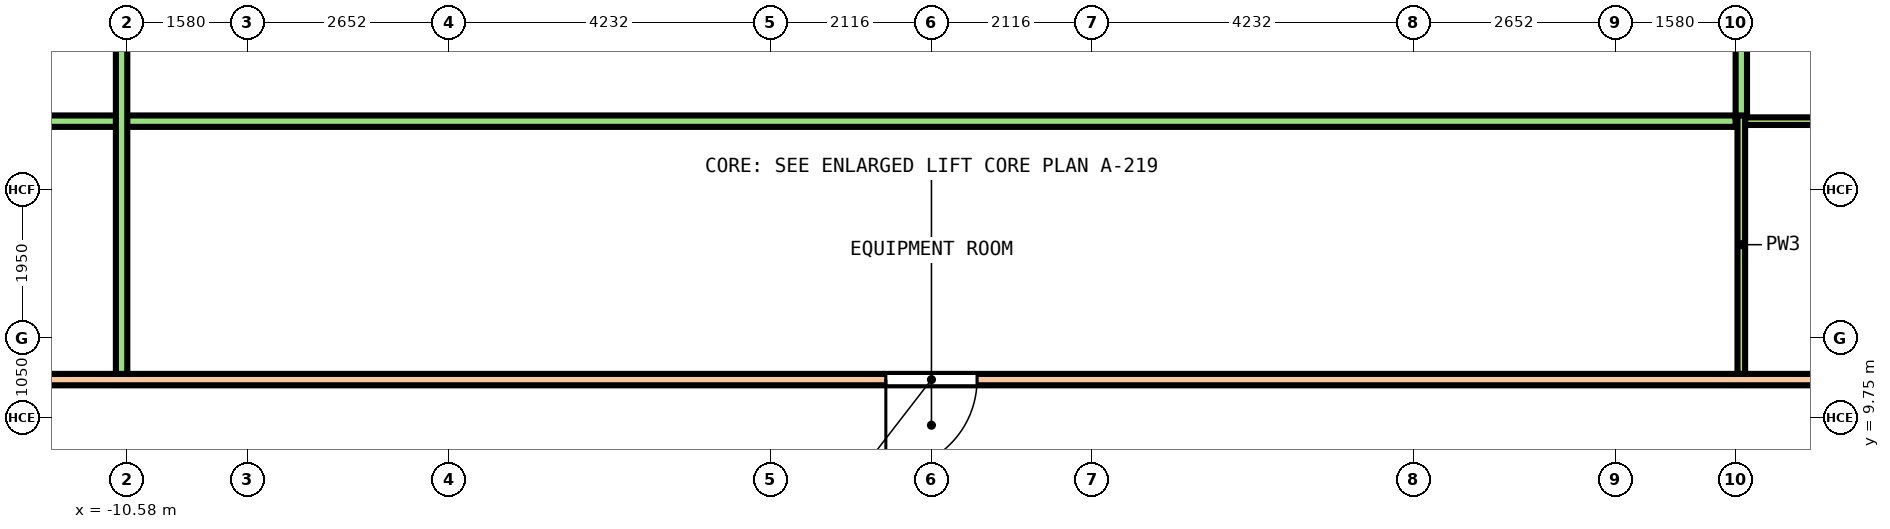
"""IFC4 building model, lengths in metres.
Left out: names, types, materials, properties, quantities, classifications, styles, units other than length and angle.
Written with IfcOpenShell. Run it as: python <this file> out.ifc"""

import sys

from ifc_helpers import new_model, si_unit, direction, frame, frame_2d, origin, place, context, subcontext, project, spatial, rectangle, extrude, element, fill, save


model = new_model("IFC4")
c1 = context("Model", 3, precision=1e-05, world=origin(), true_north=direction((0.0, 1.0)))
c2 = subcontext(c1, "Body", "Model", "MODEL_VIEW")
j1 = project(units=[si_unit("LENGTHUNIT", "METRE"), si_unit("PLANEANGLEUNIT", "RADIAN")], contexts=[c1])
p1 = place(None, origin())
s1 = spatial("IfcSite", under=j1, at=p1, CompositionType="ELEMENT")
p2 = place(p1, origin())
s2 = spatial("IfcBuilding", under=s1, at=p2, CompositionType="ELEMENT")
p3 = place(p2, frame((0.0, 0.0, 167.2)))
s3 = spatial("IfcBuildingStorey", under=s2, at=p3, CompositionType="ELEMENT", Elevation=167.2)
p4 = place(p3, frame((-15.275, 10.25, 0.0), z_axis=(0.0, 0.0, 1.0), x_axis=(1.0, 0.0, 0.0)))
e1 = element("IfcWall", 1, at=p4, inside=s3, PredefinedType="PARTITIONING", context=c2, shape_type="SweptSolid", body=[
    extrude(rectangle(XDim=30.55, YDim=0.15, at=frame_2d((15.275, 0.0))), origin(), (0.0, 0.0, 1.0), 3.05),
])
p5 = place(p4, frame((27.029, 0.0, 0.0)))
e2 = element("IfcOpeningElement", 2, at=p5, cuts=e1, PredefinedType="OPENING", context=c2, shape_type="SweptSolid", body=[
    extrude(rectangle(XDim=1.0, YDim=2.1, at=frame_2d((0.5, 1.05))), frame((0.0, 0.085, 0.0), z_axis=(0.0, -1.0, 0.0), x_axis=(1.0, 0.0, 0.0)), (0.0, 0.0, 1.0), 0.17),
])
p6 = place(p4, frame((14.675, 0.0, 0.0)))
e3 = element("IfcOpeningElement", 3, at=p6, cuts=e1, PredefinedType="OPENING", context=c2, shape_type="SweptSolid", body=[
    extrude(rectangle(XDim=1.2, YDim=2.1, at=frame_2d((0.6, 1.05))), frame((0.0, 0.085, 0.0), z_axis=(0.0, -1.0, 0.0), x_axis=(1.0, 0.0, 0.0)), (0.0, 0.0, 1.0), 0.17),
])
p7 = place(p4, frame((2.222, 0.0, 0.0)))
e4 = element("IfcOpeningElement", 4, at=p7, cuts=e1, PredefinedType="OPENING", context=c2, shape_type="SweptSolid", body=[
    extrude(rectangle(XDim=1.0, YDim=2.1, at=frame_2d((0.5, 1.05))), frame((0.0, 0.085, 0.0), z_axis=(0.0, -1.0, 0.0), x_axis=(1.0, 0.0, 0.0)), (0.0, 0.0, 1.0), 0.17),
])
p8 = place(p3, frame((-16.825, 13.65, 0.0), z_axis=(0.0, 0.0, 1.0), x_axis=(1.0, 0.0, 0.0)))
e5 = element("IfcWall", 5, at=p8, inside=s3, PredefinedType="PARTITIONING", context=c2, shape_type="SweptSolid", body=[
    extrude(rectangle(XDim=27.405, YDim=0.15, at=frame_2d((13.702, 0.0))), origin(), (0.0, 0.0, 1.0), 3.05),
])
p9 = place(p3, frame((10.655, 13.7, 0.0), z_axis=(0.0, 0.0, 1.0), x_axis=(0.0, 1.0, 0.0)))
e6 = element("IfcWall", 6, at=p9, inside=s3, PredefinedType="PARTITIONING", context=c2, shape_type="SweptSolid", body=[
    extrude(rectangle(XDim=10.069, YDim=0.15, at=frame_2d((5.035, 0.0))), origin(), (0.0, 0.0, 1.0), 3.05),
])
p10 = place(p9, frame((4.409, 0.0, 0.0)))
e7 = element("IfcOpeningElement", 7, at=p10, cuts=e6, PredefinedType="OPENING", context=c2, shape_type="SweptSolid", body=[
    extrude(rectangle(XDim=1.2, YDim=2.1, at=frame_2d((0.6, 1.05))), frame((0.0, 0.085, 0.0), z_axis=(0.0, -1.0, 0.0), x_axis=(1.0, 0.0, 0.0)), (0.0, 0.0, 1.0), 0.17),
])
p11 = place(p3, frame((-10.655, 10.325, 0.0), z_axis=(0.0, 0.0, 1.0), x_axis=(0.0, 1.0, 0.0)))
e8 = element("IfcWall", 8, at=p11, inside=s3, PredefinedType="PARTITIONING", context=c2, shape_type="SweptSolid", body=[
    extrude(rectangle(XDim=13.444, YDim=0.15, at=frame_2d((6.722, 0.0))), origin(), (0.0, 0.0, 1.0), 3.05),
])
p12 = place(p11, frame((9.839, 0.0, 0.0)))
e9 = element("IfcOpeningElement", 9, at=p12, cuts=e8, PredefinedType="OPENING", context=c2, shape_type="SweptSolid", body=[
    extrude(rectangle(XDim=1.2, YDim=2.1, at=frame_2d((0.6, 1.05))), frame((0.0, 0.085, 0.0), z_axis=(0.0, -1.0, 0.0), x_axis=(1.0, 0.0, 0.0)), (0.0, 0.0, 1.0), 0.17),
])
p13 = place(p3, frame((10.705, 13.65, 0.0), z_axis=(0.0, 0.0, 1.0), x_axis=(1.0, 0.0, 0.0)))
e10 = element("IfcWall", 10, at=p13, inside=s3, PredefinedType="PARTITIONING", context=c2, shape_type="SweptSolid", body=[
    extrude(rectangle(XDim=5.002, YDim=0.1, at=frame_2d((2.501, 0.0))), origin(), (0.0, 0.0, 1.0), 3.05),
])
p14 = place(p13, frame((2.527, 0.0, 0.0)))
e11 = element("IfcOpeningElement", 11, at=p14, cuts=e10, PredefinedType="OPENING", context=c2, shape_type="SweptSolid", body=[
    extrude(rectangle(XDim=1.0, YDim=2.1, at=frame_2d((0.5, 1.05))), frame((0.0, 0.06, 0.0), z_axis=(0.0, -1.0, 0.0), x_axis=(1.0, 0.0, 0.0)), (0.0, 0.0, 1.0), 0.12),
])
p15 = place(p3, frame((10.655, 10.325, 0.0), z_axis=(0.0, 0.0, 1.0), x_axis=(0.0, 1.0, 0.0)))
e12 = element("IfcWall", 12, at=p15, inside=s3, PredefinedType="PARTITIONING", context=c2, shape_type="SweptSolid", body=[
    extrude(rectangle(XDim=3.4, YDim=0.1, at=frame_2d((1.7, 0.0))), origin(), (0.0, 0.0, 1.0), 3.05),
])
p16 = place(p6, origin())
e13 = element("IfcDoor", 13, at=p16, inside=s3, OperationType="DOUBLE_DOOR_SINGLE_SWING", PredefinedType="DOOR", context=c2, shape_type="SweptSolid", body=[
    extrude(rectangle(XDim=1.2, YDim=2.1, at=frame_2d((0.6, 1.05))), frame((0.0, 0.025, 0.0), z_axis=(0.0, -1.0, 0.0), x_axis=(1.0, 0.0, 0.0)), (0.0, 0.0, 1.0), 0.05),
])
fill(e3, e13)
save(model, sys.argv[1])
